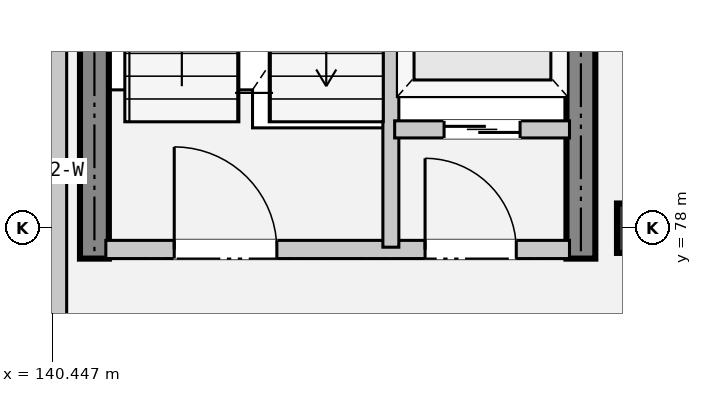
"""IFC4 building model, lengths in metres.
Left out: names, types, materials, properties, quantities, classifications, styles, units other than length and angle.
Written with IfcOpenShell. Run it as: python <this file> out.ifc"""

import sys

from ifc_helpers import new_model, si_unit, direction, frame, frame_2d, origin, origin_2d, place, context, subcontext, project, spatial, rectangle, extrude, element, fill, save


model = new_model("IFC4")
c1 = context("Model", 3, precision=1e-05, world=origin(), true_north=direction((0.0, 1.0)))
c2 = subcontext(c1, "Body", "Model", "MODEL_VIEW")
j1 = project(units=[si_unit("LENGTHUNIT", "METRE"), si_unit("PLANEANGLEUNIT", "RADIAN")], contexts=[c1])
p1 = place(None, origin())
s1 = spatial("IfcSite", under=j1, at=p1, CompositionType="ELEMENT")
p2 = place(p1, origin())
s2 = spatial("IfcBuilding", under=s1, at=p2, CompositionType="ELEMENT")
p3 = place(p2, frame((0.0, 0.0, 10.2)))
s3 = spatial("IfcBuildingStorey", under=s2, at=p3, CompositionType="ELEMENT", Elevation=10.2)
p4 = place(p3, frame((148.2, 78.0, 0.0), z_axis=(0.0, 0.0, 1.0), x_axis=(1.0, 0.0, 0.0)))
e1 = element("IfcColumn", 1, at=p4, inside=s3, PredefinedType="COLUMN", context=c2, shape_type="SweptSolid", body=[
    extrude(rectangle(XDim=0.65, YDim=0.65, at=origin_2d()), origin(), (0.0, 0.0, 1.0), 4.8),
])
for number, where, z_axis, x_axis in (
    (2, (141.0, 77.6, 0.0), (0.0, 0.0, 1.0), (0.0, 1.0, 0.0)),
    (3, (147.4, 77.6, 0.0), (0.0, 0.0, 1.0), (0.0, 1.0, 0.0)),
):
    element("IfcWall", number, at=place(p3, frame(where, z_axis=z_axis, x_axis=x_axis)), inside=s3, PredefinedType="SHEAR", context=c2, shape_type="SweptSolid", body=[
        extrude(rectangle(XDim=8.6, YDim=0.38, at=frame_2d((4.3, 0.0))), origin(), (0.0, 0.0, 1.0), 4.8),
    ])
p5 = place(p3, frame((140.48, 32.0, 0.0), z_axis=(0.0, 0.0, 1.0), x_axis=(0.0, 1.0, 0.0)))
e4 = element("IfcWall", 4, at=p5, inside=s3, PredefinedType="SOLIDWALL", context=c2, shape_type="SweptSolid", body=[
    extrude(rectangle(XDim=76.8, YDim=0.31, at=frame_2d((38.4, 0.0))), origin(), (0.0, 0.0, 1.0), 3.86),
])
p6 = place(p5, frame((5.0, 0.0, 0.78)))
e5 = element("IfcOpeningElement", 5, at=p6, cuts=e4, PredefinedType="OPENING", context=c2, shape_type="SweptSolid", body=[
    extrude(rectangle(XDim=1.8, YDim=2.1, at=frame_2d((0.9, 1.05))), frame((0.0, 0.165, 0.0), z_axis=(0.0, -1.0, 0.0), x_axis=(1.0, 0.0, 0.0)), (0.0, 0.0, 1.0), 0.33),
])
p7 = place(p5, frame((16.7, 0.0, 0.78)))
e6 = element("IfcOpeningElement", 6, at=p7, cuts=e4, PredefinedType="OPENING", context=c2, shape_type="SweptSolid", body=[
    extrude(rectangle(XDim=1.8, YDim=2.1, at=frame_2d((0.9, 1.05))), frame((0.0, 0.165, 0.0), z_axis=(0.0, -1.0, 0.0), x_axis=(1.0, 0.0, 0.0)), (0.0, 0.0, 1.0), 0.33),
])
p8 = place(p5, frame((24.5, 0.0, 0.78)))
e7 = element("IfcOpeningElement", 7, at=p8, cuts=e4, PredefinedType="OPENING", context=c2, shape_type="SweptSolid", body=[
    extrude(rectangle(XDim=1.8, YDim=2.1, at=frame_2d((0.9, 1.05))), frame((0.0, 0.165, 0.0), z_axis=(0.0, -1.0, 0.0), x_axis=(1.0, 0.0, 0.0)), (0.0, 0.0, 1.0), 0.33),
])
p9 = place(p5, frame((32.3, 0.0, 0.78)))
e8 = element("IfcOpeningElement", 8, at=p9, cuts=e4, PredefinedType="OPENING", context=c2, shape_type="SweptSolid", body=[
    extrude(rectangle(XDim=1.8, YDim=2.1, at=frame_2d((0.9, 1.05))), frame((0.0, 0.165, 0.0), z_axis=(0.0, -1.0, 0.0), x_axis=(1.0, 0.0, 0.0)), (0.0, 0.0, 1.0), 0.33),
])
p10 = place(p5, frame((40.1, 0.0, 0.78)))
e9 = element("IfcOpeningElement", 9, at=p10, cuts=e4, PredefinedType="OPENING", context=c2, shape_type="SweptSolid", body=[
    extrude(rectangle(XDim=1.8, YDim=2.1, at=frame_2d((0.9, 1.05))), frame((0.0, 0.165, 0.0), z_axis=(0.0, -1.0, 0.0), x_axis=(1.0, 0.0, 0.0)), (0.0, 0.0, 1.0), 0.33),
])
p11 = place(p5, frame((55.7, 0.0, 0.78)))
e10 = element("IfcOpeningElement", 10, at=p11, cuts=e4, PredefinedType="OPENING", context=c2, shape_type="SweptSolid", body=[
    extrude(rectangle(XDim=1.8, YDim=2.1, at=frame_2d((0.9, 1.05))), frame((0.0, 0.165, 0.0), z_axis=(0.0, -1.0, 0.0), x_axis=(1.0, 0.0, 0.0)), (0.0, 0.0, 1.0), 0.33),
])
p12 = place(p5, frame((59.6, 0.0, 0.78)))
e11 = element("IfcOpeningElement", 11, at=p12, cuts=e4, PredefinedType="OPENING", context=c2, shape_type="SweptSolid", body=[
    extrude(rectangle(XDim=1.8, YDim=2.1, at=frame_2d((0.9, 1.05))), frame((0.0, 0.165, 0.0), z_axis=(0.0, -1.0, 0.0), x_axis=(1.0, 0.0, 0.0)), (0.0, 0.0, 1.0), 0.33),
])
p13 = place(p5, frame((63.5, 0.0, 0.78)))
e12 = element("IfcOpeningElement", 12, at=p13, cuts=e4, PredefinedType="OPENING", context=c2, shape_type="SweptSolid", body=[
    extrude(rectangle(XDim=1.8, YDim=2.1, at=frame_2d((0.9, 1.05))), frame((0.0, 0.165, 0.0), z_axis=(0.0, -1.0, 0.0), x_axis=(1.0, 0.0, 0.0)), (0.0, 0.0, 1.0), 0.33),
])
p14 = place(p5, frame((67.4, 0.0, 0.78)))
e13 = element("IfcOpeningElement", 13, at=p14, cuts=e4, PredefinedType="OPENING", context=c2, shape_type="SweptSolid", body=[
    extrude(rectangle(XDim=1.8, YDim=2.1, at=frame_2d((0.9, 1.05))), frame((0.0, 0.165, 0.0), z_axis=(0.0, -1.0, 0.0), x_axis=(1.0, 0.0, 0.0)), (0.0, 0.0, 1.0), 0.33),
])
p15 = place(p5, frame((71.3, 0.0, 0.78)))
e14 = element("IfcOpeningElement", 14, at=p15, cuts=e4, PredefinedType="OPENING", context=c2, shape_type="SweptSolid", body=[
    extrude(rectangle(XDim=1.8, YDim=2.1, at=frame_2d((0.9, 1.05))), frame((0.0, 0.165, 0.0), z_axis=(0.0, -1.0, 0.0), x_axis=(1.0, 0.0, 0.0)), (0.0, 0.0, 1.0), 0.33),
])
p16 = place(p3, frame((141.15, 77.72, 0.0), z_axis=(0.0, 0.0, 1.0), x_axis=(1.0, 0.0, 0.0)))
e15 = element("IfcWall", 15, at=p16, inside=s3, PredefinedType="PARTITIONING", context=c2, shape_type="SweptSolid", body=[
    extrude(rectangle(XDim=6.1, YDim=0.24, at=frame_2d((3.05, 0.0))), origin(), (0.0, 0.0, 1.0), 3.86),
])
p17 = place(p16, frame((0.9, 0.0, 0.0)))
e16 = element("IfcOpeningElement", 16, at=p17, cuts=e15, PredefinedType="OPENING", context=c2, shape_type="SweptSolid", body=[
    extrude(rectangle(XDim=1.35, YDim=2.2, at=frame_2d((0.675, 1.1))), frame((0.0, 0.13, 0.0), z_axis=(0.0, -1.0, 0.0), x_axis=(1.0, 0.0, 0.0)), (0.0, 0.0, 1.0), 0.26),
])
p18 = place(p16, frame((4.2, 0.0, 0.0)))
e17 = element("IfcOpeningElement", 17, at=p18, cuts=e15, PredefinedType="OPENING", context=c2, shape_type="SweptSolid", body=[
    extrude(rectangle(XDim=1.2, YDim=2.2, at=frame_2d((0.6, 1.1))), frame((0.0, 0.13, 0.0), z_axis=(0.0, -1.0, 0.0), x_axis=(1.0, 0.0, 0.0)), (0.0, 0.0, 1.0), 0.26),
])
p19 = place(p3, frame((144.9, 77.75, 0.0), z_axis=(0.0, 0.0, 1.0), x_axis=(0.0, 1.0, 0.0)))
e18 = element("IfcWall", 18, at=p19, inside=s3, PredefinedType="PARTITIONING", context=c2, shape_type="SweptSolid", body=[
    extrude(rectangle(XDim=8.3, YDim=0.21, at=frame_2d((4.15, 0.0))), origin(), (0.0, 0.0, 1.0), 3.86),
])
p20 = place(p3, frame((144.95, 79.3, 0.0), z_axis=(0.0, 0.0, 1.0), x_axis=(1.0, 0.0, 0.0)))
e19 = element("IfcWall", 19, at=p20, inside=s3, PredefinedType="PARTITIONING", context=c2, shape_type="SweptSolid", body=[
    extrude(rectangle(XDim=2.3, YDim=0.225, at=frame_2d((1.15, 0.0))), origin(), (0.0, 0.0, 1.0), 3.86),
])
p21 = place(p20, frame((0.65, 0.0, 0.0)))
e20 = element("IfcOpeningElement", 20, at=p21, cuts=e19, PredefinedType="OPENING", context=c2, shape_type="SweptSolid", body=[
    extrude(rectangle(XDim=1.0, YDim=2.15, at=frame_2d((0.5, 1.075))), frame((0.0, 0.123, 0.0), z_axis=(0.0, -1.0, 0.0), x_axis=(1.0, 0.0, 0.0)), (0.0, 0.0, 1.0), 0.245),
])
p22 = place(p17, origin())
e21 = element("IfcDoor", 21, at=p22, inside=s3, OperationType="SINGLE_SWING_RIGHT", PredefinedType="DOOR", context=c2, shape_type="SweptSolid", body=[
    extrude(rectangle(XDim=1.35, YDim=2.2, at=frame_2d((0.675, 1.1))), frame((0.0, 0.025, 0.0), z_axis=(0.0, -1.0, 0.0), x_axis=(1.0, 0.0, 0.0)), (0.0, 0.0, 1.0), 0.05),
])
fill(e16, e21)
p23 = place(p18, origin())
e22 = element("IfcDoor", 22, at=p23, inside=s3, OperationType="SINGLE_SWING_LEFT", PredefinedType="DOOR", context=c2, shape_type="SweptSolid", body=[
    extrude(rectangle(XDim=1.2, YDim=2.2, at=frame_2d((0.6, 1.1))), frame((0.0, 0.025, 0.0), z_axis=(0.0, -1.0, 0.0), x_axis=(1.0, 0.0, 0.0)), (0.0, 0.0, 1.0), 0.05),
])
fill(e17, e22)
p24 = place(p21, origin())
e23 = element("IfcDoor", 23, at=p24, inside=s3, OperationType="SLIDING_TO_RIGHT", PredefinedType="DOOR", context=c2, shape_type="SweptSolid", body=[
    extrude(rectangle(XDim=1.0, YDim=2.15, at=frame_2d((0.5, 1.075))), frame((0.0, 0.025, 0.0), z_axis=(0.0, -1.0, 0.0), x_axis=(1.0, 0.0, 0.0)), (0.0, 0.0, 1.0), 0.05),
])
fill(e20, e23)
save(model, sys.argv[1])
